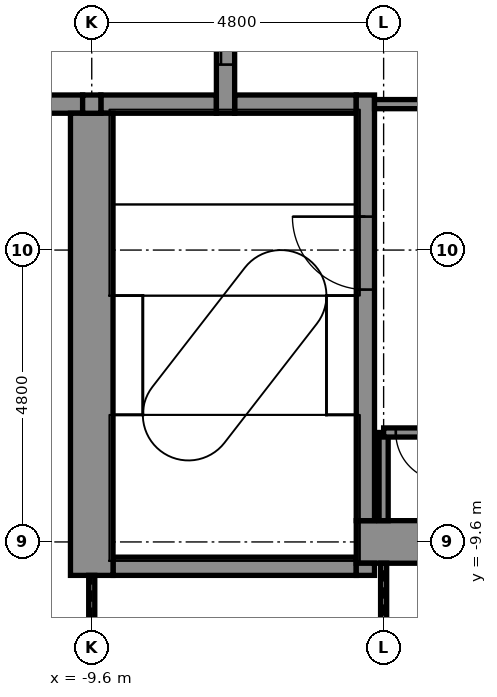
"""IFC4 building model, lengths in metres.
Left out: names, types, materials, properties, quantities, classifications, styles, units other than length and angle.
Written with IfcOpenShell. Run it as: python <this file> out.ifc"""

import sys

from ifc_helpers import new_model, si_unit, direction, frame, frame_2d, origin, place, context, subcontext, project, spatial, rectangle, extrude, element, fill, save


model = new_model("IFC4")
c1 = context("Model", 3, precision=1e-05, world=origin(), true_north=direction((0.0, 1.0)))
c2 = subcontext(c1, "Body", "Model", "MODEL_VIEW")
j1 = project(units=[si_unit("LENGTHUNIT", "METRE"), si_unit("PLANEANGLEUNIT", "RADIAN")], contexts=[c1])
p1 = place(None, origin())
s1 = spatial("IfcSite", under=j1, at=p1, CompositionType="ELEMENT")
p2 = place(p1, origin())
s2 = spatial("IfcBuilding", under=s1, at=p2, CompositionType="ELEMENT")
p3 = place(p2, frame((0.0, 0.0, 133.4)))
s3 = spatial("IfcBuildingStorey", under=s2, at=p3, CompositionType="ELEMENT", Elevation=133.4)
p4 = place(p3, frame((-9.25, -10.0, -0.15), z_axis=(0.0, 0.0, 1.0), x_axis=(1.0, 0.0, 0.0)))
e1 = element("IfcWall", 1, at=p4, inside=s3, PredefinedType="STANDARD", context=c2, shape_type="SweptSolid", body=[
    extrude(rectangle(XDim=4.0, YDim=0.3, at=frame_2d((2.0, 0.0))), origin(), (0.0, 0.0, 1.0), 5.4),
])
p5 = place(p3, frame((-5.25, -9.6, -0.15), z_axis=(0.0, 0.0, 1.0), x_axis=(1.0, 0.0, 0.0)))
e2 = element("IfcWall", 2, at=p5, inside=s3, PredefinedType="SHEAR", context=c2, shape_type="SweptSolid", body=[
    extrude(rectangle(XDim=10.2, YDim=0.7, at=frame_2d((5.1, 0.0))), origin(), (0.0, 0.0, 1.0), 5.4),
])
p6 = place(p5, frame((9.0, 0.0, 0.15)))
e3 = element("IfcOpeningElement", 3, at=p6, cuts=e2, PredefinedType="OPENING", context=c2, shape_type="SweptSolid", body=[
    extrude(rectangle(XDim=0.9, YDim=2.1, at=frame_2d((0.45, 1.05))), frame((0.0, 0.36, 0.0), z_axis=(0.0, -1.0, 0.0), x_axis=(1.0, 0.0, 0.0)), (0.0, 0.0, 1.0), 0.72),
])
p7 = place(p3, frame((-10.85, -2.4, -0.15), z_axis=(0.0, 0.0, 1.0), x_axis=(1.0, 0.0, 0.0)))
e4 = element("IfcWall", 4, at=p7, inside=s3, PredefinedType="STANDARD", context=c2, shape_type="SweptSolid", body=[
    extrude(rectangle(XDim=1.1, YDim=0.3, at=frame_2d((0.55, 0.0))), origin(), (0.0, 0.0, 1.0), 5.4),
])
p8 = place(p3, frame((-9.45, -2.4, -0.15), z_axis=(0.0, 0.0, 1.0), x_axis=(1.0, 0.0, 0.0)))
e5 = element("IfcWall", 5, at=p8, inside=s3, PredefinedType="STANDARD", context=c2, shape_type="SweptSolid", body=[
    extrude(rectangle(XDim=1.9, YDim=0.3, at=frame_2d((0.95, 0.0))), origin(), (0.0, 0.0, 1.0), 5.4),
])
p9 = place(p3, frame((-7.25, -2.4, -0.15), z_axis=(0.0, 0.0, 1.0), x_axis=(1.0, 0.0, 0.0)))
e6 = element("IfcWall", 6, at=p9, inside=s3, PredefinedType="STANDARD", context=c2, shape_type="SweptSolid", body=[
    extrude(rectangle(XDim=2.0, YDim=0.3, at=frame_2d((1.0, 0.0))), origin(), (0.0, 0.0, 1.0), 5.4),
])
p10 = place(p3, frame((-9.6, -10.15, -0.15), z_axis=(0.0, 0.0, 1.0), x_axis=(0.0, 1.0, 0.0)))
e7 = element("IfcWall", 7, at=p10, inside=s3, PredefinedType="SHEAR", context=c2, shape_type="SweptSolid", body=[
    extrude(rectangle(XDim=7.6, YDim=0.7, at=frame_2d((3.8, 0.0))), origin(), (0.0, 0.0, 1.0), 5.4),
])
p11 = place(p3, frame((-9.6, -2.55, -0.15), z_axis=(0.0, 0.0, 1.0), x_axis=(0.0, 1.0, 0.0)))
e8 = element("IfcWall", 8, at=p11, inside=s3, PredefinedType="STANDARD", context=c2, shape_type="SweptSolid", body=[
    extrude(rectangle(XDim=0.3, YDim=0.3, at=frame_2d((0.15, 0.0))), origin(), (0.0, 0.0, 1.0), 5.4),
])
p12 = place(p3, frame((-7.4, -2.55, -0.15), z_axis=(0.0, 0.0, 1.0), x_axis=(0.0, 1.0, 0.0)))
e9 = element("IfcWall", 9, at=p12, inside=s3, PredefinedType="STANDARD", context=c2, shape_type="SweptSolid", body=[
    extrude(rectangle(XDim=5.1, YDim=0.3, at=frame_2d((2.55, 0.0))), origin(), (0.0, 0.0, 1.0), 5.4),
])
p13 = place(p12, frame((0.8, 0.0, 0.15)))
e10 = element("IfcOpeningElement", 10, at=p13, cuts=e9, PredefinedType="OPENING", context=c2, shape_type="SweptSolid", body=[
    extrude(rectangle(XDim=1.1, YDim=2.1, at=frame_2d((0.55, 1.05))), frame((0.0, 0.16, 0.0), z_axis=(0.0, -1.0, 0.0), x_axis=(1.0, 0.0, 0.0)), (0.0, 0.0, 1.0), 0.32),
])
p14 = place(p12, frame((3.2, 0.0, 0.15)))
e11 = element("IfcOpeningElement", 11, at=p14, cuts=e9, PredefinedType="OPENING", context=c2, shape_type="SweptSolid", body=[
    extrude(rectangle(XDim=1.1, YDim=2.1, at=frame_2d((0.55, 1.05))), frame((0.0, 0.16, 0.0), z_axis=(0.0, -1.0, 0.0), x_axis=(1.0, 0.0, 0.0)), (0.0, 0.0, 1.0), 0.32),
])
p15 = place(p3, frame((-5.1, -10.15, -0.15), z_axis=(0.0, 0.0, 1.0), x_axis=(0.0, 1.0, 0.0)))
e12 = element("IfcWall", 12, at=p15, inside=s3, PredefinedType="STANDARD", context=c2, shape_type="SweptSolid", body=[
    extrude(rectangle(XDim=0.2, YDim=0.3, at=frame_2d((0.1, 0.0))), origin(), (0.0, 0.0, 1.0), 5.4),
])
p16 = place(p3, frame((-5.1, -9.25, -0.15), z_axis=(0.0, 0.0, 1.0), x_axis=(0.0, 1.0, 0.0)))
e13 = element("IfcWall", 13, at=p16, inside=s3, PredefinedType="STANDARD", context=c2, shape_type="SweptSolid", body=[
    extrude(rectangle(XDim=7.0, YDim=0.3, at=frame_2d((3.5, 0.0))), origin(), (0.0, 0.0, 1.0), 5.4),
])
p17 = place(p16, frame((3.8, 0.0, 0.15)))
e14 = element("IfcOpeningElement", 14, at=p17, cuts=e13, PredefinedType="OPENING", context=c2, shape_type="SweptSolid", body=[
    extrude(rectangle(XDim=1.2, YDim=2.1, at=frame_2d((0.6, 1.05))), frame((0.0, 0.16, 0.0), z_axis=(0.0, -1.0, 0.0), x_axis=(1.0, 0.0, 0.0)), (0.0, 0.0, 1.0), 0.32),
])
p18 = place(p3, frame((-4.8, -13.6, 0.0), z_axis=(0.0, 0.0, 1.0), x_axis=(0.0, 1.0, 0.0)))
e15 = element("IfcWall", 15, at=p18, inside=s3, PredefinedType="PARTITIONING", context=c2, shape_type="SweptSolid", body=[
    extrude(rectangle(XDim=3.65, YDim=0.1, at=frame_2d((1.825, 0.0))), origin(), (0.0, 0.0, 1.0), 4.566),
])
p19 = place(p3, frame((-4.8, -9.25, 0.0), z_axis=(0.0, 0.0, 1.0), x_axis=(0.0, 1.0, 0.0)))
e16 = element("IfcWall", 16, at=p19, inside=s3, PredefinedType="PARTITIONING", context=c2, shape_type="SweptSolid", body=[
    extrude(rectangle(XDim=1.45, YDim=0.15, at=frame_2d((0.725, 0.0))), origin(), (0.0, 0.0, 1.0), 5.25),
])
p20 = place(p3, frame((-9.6, -13.6, 0.0), z_axis=(0.0, 0.0, 1.0), x_axis=(0.0, 1.0, 0.0)))
e17 = element("IfcWall", 17, at=p20, inside=s3, PredefinedType="PARTITIONING", context=c2, shape_type="SweptSolid", body=[
    extrude(rectangle(XDim=3.45, YDim=0.1, at=frame_2d((1.725, 0.0))), origin(), (0.0, 0.0, 1.0), 4.566),
])
p21 = place(p3, frame((-4.8, -7.8, 0.0), z_axis=(0.0, 0.0, 1.0), x_axis=(1.0, 0.0, 0.0)))
e18 = element("IfcWall", 18, at=p21, inside=s3, PredefinedType="PARTITIONING", context=c2, shape_type="SweptSolid", body=[
    extrude(rectangle(XDim=1.05, YDim=0.15, at=frame_2d((0.525, 0.0))), origin(), (0.0, 0.0, 1.0), 5.25),
])
p22 = place(p21, frame((0.2, 0.0, 0.0)))
e19 = element("IfcOpeningElement", 19, at=p22, cuts=e18, PredefinedType="OPENING", context=c2, shape_type="SweptSolid", body=[
    extrude(rectangle(XDim=0.8, YDim=2.1, at=frame_2d((0.4, 1.05))), frame((0.0, 0.085, 0.0), z_axis=(0.0, -1.0, 0.0), x_axis=(1.0, 0.0, 0.0)), (0.0, 0.0, 1.0), 0.17),
])
p23 = place(p3, frame((-4.95, -2.4, 0.0), z_axis=(0.0, 0.0, 1.0), x_axis=(1.0, 0.0, 0.0)))
e20 = element("IfcWall", 20, at=p23, inside=s3, PredefinedType="PARTITIONING", context=c2, shape_type="SweptSolid", body=[
    extrude(rectangle(XDim=1.2, YDim=0.15, at=frame_2d((0.6, 0.0))), origin(), (0.0, 0.0, 1.0), 5.25),
])
p24 = place(p22, frame((0.8, 0.0, 0.0), z_axis=(0.0, 0.0, 1.0), x_axis=(-1.0, 0.0, 0.0)))
e21 = element("IfcDoor", 21, at=p24, inside=s3, OperationType="SINGLE_SWING_RIGHT", PredefinedType="DOOR", context=c2, shape_type="SweptSolid", body=[
    extrude(rectangle(XDim=0.8, YDim=2.1, at=frame_2d((0.4, 1.05))), frame((0.0, 0.025, 0.0), z_axis=(0.0, -1.0, 0.0), x_axis=(1.0, 0.0, 0.0)), (0.0, 0.0, 1.0), 0.05),
])
fill(e19, e21)
p25 = place(p13, origin())
e22 = element("IfcDoor", 22, at=p25, inside=s3, OperationType="DOUBLE_DOOR_SLIDING", PredefinedType="DOOR", context=c2, shape_type="SweptSolid", body=[
    extrude(rectangle(XDim=1.1, YDim=2.1, at=frame_2d((0.55, 1.05))), frame((0.0, 0.025, 0.0), z_axis=(0.0, -1.0, 0.0), x_axis=(1.0, 0.0, 0.0)), (0.0, 0.0, 1.0), 0.05),
])
fill(e10, e22)
p26 = place(p17, origin())
e23 = element("IfcDoor", 23, at=p26, inside=s3, OperationType="SINGLE_SWING_RIGHT", PredefinedType="DOOR", context=c2, shape_type="SweptSolid", body=[
    extrude(rectangle(XDim=1.2, YDim=2.1, at=frame_2d((0.6, 1.05))), frame((0.0, 0.025, 0.0), z_axis=(0.0, -1.0, 0.0), x_axis=(1.0, 0.0, 0.0)), (0.0, 0.0, 1.0), 0.05),
])
fill(e14, e23)
save(model, sys.argv[1])
